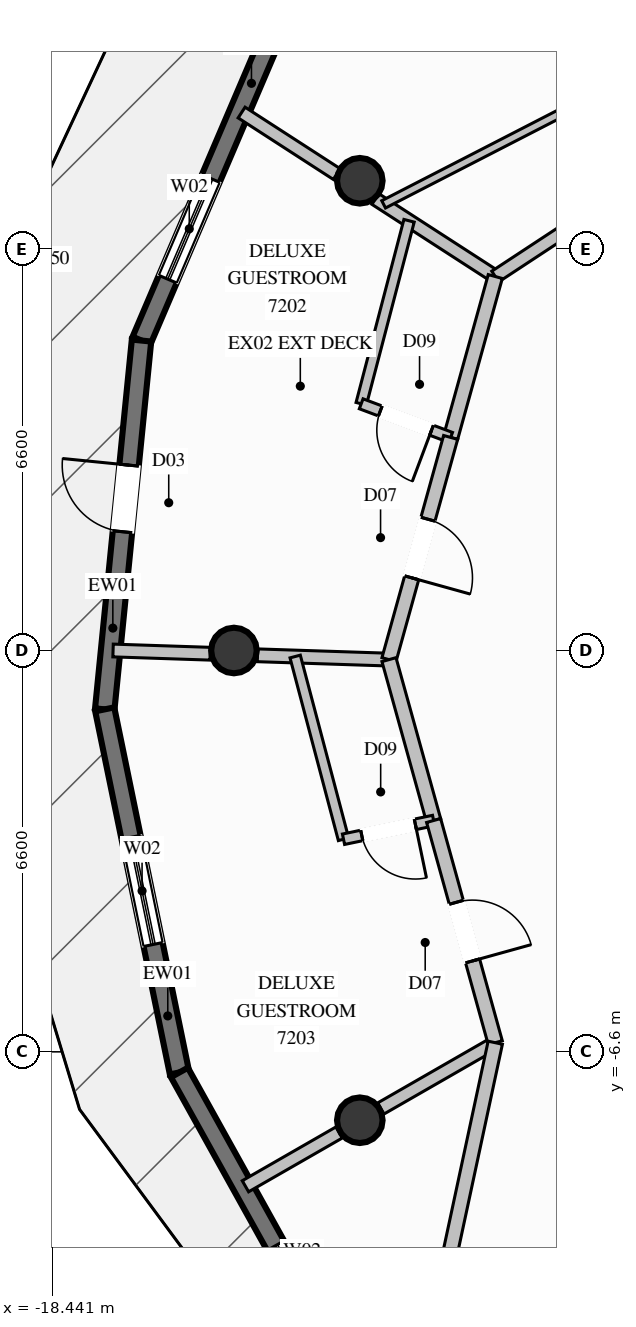
"""IFC4 building model, lengths in metres.
Left out: names, types, materials, properties, quantities, classifications, styles, units other than length and angle.
Written with IfcOpenShell. Run it as: python <this file> out.ifc"""

import sys

from ifc_helpers import new_model, si_unit, direction, frame, frame_2d, origin, origin_2d, place, context, subcontext, project, spatial, rectangle, circle, extrude, element, fill, save


model = new_model("IFC4")
c1 = context("Model", 3, precision=1e-05, world=origin(), true_north=direction((0.0, 1.0)))
c2 = subcontext(c1, "Body", "Model", "MODEL_VIEW")
j1 = project(units=[si_unit("LENGTHUNIT", "METRE"), si_unit("PLANEANGLEUNIT", "RADIAN")], contexts=[c1])
p1 = place(None, origin())
s1 = spatial("IfcSite", under=j1, at=p1, CompositionType="ELEMENT")
p2 = place(p1, origin())
s2 = spatial("IfcBuilding", under=s1, at=p2, CompositionType="ELEMENT")
p3 = place(p2, frame((0.0, 0.0, 270.6)))
s3 = spatial("IfcBuildingStorey", under=s2, at=p3, CompositionType="ELEMENT", Elevation=270.6)
for number, where, z_axis, x_axis in (
    (1, (-13.38, 7.725, 0.0), (0.0, 0.0, 1.0), (1.0, 0.0, 0.0)),
    (2, (-15.45, 0.0, 0.0), (0.0, 0.0, 1.0), (1.0, 0.0, 0.0)),
    (3, (-13.38, -7.725, 0.0), (0.0, 0.0, 1.0), (1.0, 0.0, 0.0)),
):
    element("IfcColumn", number, at=place(p3, frame(where, z_axis=z_axis, x_axis=x_axis)), inside=s3, PredefinedType="COLUMN", context=c2, shape_type="SweptSolid", body=[
        extrude(circle(Radius=0.375, at=origin_2d()), origin(), (0.0, 0.0, 1.0), 3.8),
    ])
p4 = place(p3, frame((-16.97, 5.097, 0.0), z_axis=(0.0, 0.0, 1.0), x_axis=(0.392999104836, 0.919538853773, 0.0)))
e4 = element("IfcWall", 4, at=p4, inside=s3, PredefinedType="SOLIDWALL", context=c2, shape_type="SweptSolid", body=[
    extrude(rectangle(XDim=6.053, YDim=0.32, at=frame_2d((3.027, 0.0))), origin(), (0.0, 0.0, 1.0), 3.57),
])
p5 = place(p4, frame((1.098, 0.0, 0.35)))
e5 = element("IfcOpeningElement", 5, at=p5, cuts=e4, PredefinedType="OPENING", context=c2, shape_type="SweptSolid", body=[
    extrude(rectangle(XDim=1.8, YDim=2.6, at=frame_2d((0.9, 1.3))), frame((0.0, 0.17, 0.0), z_axis=(0.0, -1.0, 0.0), x_axis=(1.0, 0.0, 0.0)), (0.0, 0.0, 1.0), 0.34),
])
p6 = place(p3, frame((-17.575, -0.968, 0.0), z_axis=(0.0, 0.0, 1.0), x_axis=(0.09925782999, 0.995061748429, 0.0)))
e6 = element("IfcWall", 6, at=p6, inside=s3, PredefinedType="SOLIDWALL", context=c2, shape_type="SweptSolid", body=[
    extrude(rectangle(XDim=6.095, YDim=0.32, at=frame_2d((3.047, 0.0))), origin(), (0.0, 0.0, 1.0), 3.57),
])
p7 = place(p6, frame((2.936, 0.0, 0.0)))
e7 = element("IfcOpeningElement", 7, at=p7, cuts=e6, PredefinedType="OPENING", context=c2, shape_type="SweptSolid", body=[
    extrude(rectangle(XDim=1.1, YDim=2.2, at=frame_2d((0.55, 1.1))), frame((0.0, 0.17, 0.0), z_axis=(0.0, -1.0, 0.0), x_axis=(1.0, 0.0, 0.0)), (0.0, 0.0, 1.0), 0.34),
])
p8 = place(p3, frame((-16.347, -6.939, 0.0), z_axis=(0.0, 0.0, 1.0), x_axis=(-0.201450639807, 0.979498667545, 0.0)))
e8 = element("IfcWall", 8, at=p8, inside=s3, PredefinedType="SOLIDWALL", context=c2, shape_type="SweptSolid", body=[
    extrude(rectangle(XDim=6.096, YDim=0.32, at=frame_2d((3.048, 0.0))), origin(), (0.0, 0.0, 1.0), 3.57),
])
p9 = place(p8, frame((2.148, 0.0, 0.35)))
e9 = element("IfcOpeningElement", 9, at=p9, cuts=e8, PredefinedType="OPENING", context=c2, shape_type="SweptSolid", body=[
    extrude(rectangle(XDim=1.8, YDim=2.6, at=frame_2d((0.9, 1.3))), frame((0.0, 0.17, 0.0), z_axis=(0.0, -1.0, 0.0), x_axis=(1.0, 0.0, 0.0)), (0.0, 0.0, 1.0), 0.34),
])
p10 = place(p3, frame((-13.407, -12.23, 0.0), z_axis=(0.0, 0.0, 1.0), x_axis=(-0.485704572822, 0.87412302792, 0.0)))
e10 = element("IfcWall", 10, at=p10, inside=s3, PredefinedType="SOLIDWALL", context=c2, shape_type="SweptSolid", body=[
    extrude(rectangle(XDim=6.053, YDim=0.32, at=frame_2d((3.026, 0.0))), origin(), (0.0, 0.0, 1.0), 3.57),
])
p11 = place(p10, frame((0.995, 0.0, 0.35)))
e11 = element("IfcOpeningElement", 11, at=p11, cuts=e10, PredefinedType="OPENING", context=c2, shape_type="SweptSolid", body=[
    extrude(rectangle(XDim=1.8, YDim=2.6, at=frame_2d((0.9, 1.3))), frame((0.0, 0.17, 0.0), z_axis=(0.0, -1.0, 0.0), x_axis=(1.0, 0.0, 0.0)), (0.0, 0.0, 1.0), 0.34),
])
p12 = place(p3, frame((-11.152, 6.15, 0.0), z_axis=(0.0, 0.0, 1.0), x_axis=(-0.83972632371, 0.54300985375, 0.0)))
e12 = element("IfcWall", 12, at=p12, inside=s3, PredefinedType="PARTITIONING", context=c2, shape_type="SweptSolid", body=[
    extrude(rectangle(XDim=2.348, YDim=0.21, at=frame_2d((1.174, 0.0))), origin(), (0.0, 0.0, 1.0), 3.011),
])
p13 = place(p3, frame((-13.759, 7.835, 0.0), z_axis=(0.0, 0.0, 1.0), x_axis=(-0.83972828355, 0.543006822982, 0.0)))
e13 = element("IfcWall", 13, at=p13, inside=s3, PredefinedType="PARTITIONING", context=c2, shape_type="SweptSolid", body=[
    extrude(rectangle(XDim=1.864, YDim=0.21, at=frame_2d((0.932, 0.0))), origin(), (0.0, 0.0, 1.0), 3.57),
])
p14 = place(p3, frame((-12.9, -0.15, 0.0), z_axis=(0.0, 0.0, 1.0), x_axis=(-0.999464758513, 0.032713857784, 0.0)))
e14 = element("IfcWall", 14, at=p14, inside=s3, PredefinedType="PARTITIONING", context=c2, shape_type="SweptSolid", body=[
    extrude(rectangle(XDim=2.164, YDim=0.21, at=frame_2d((1.082, 0.0))), origin(), (0.0, 0.0, 1.0), 3.57),
])
p15 = place(p3, frame((-15.841, -0.053, 0.0), z_axis=(0.0, 0.0, 1.0), x_axis=(-0.999450151728, 0.033157114038, 0.0)))
e15 = element("IfcWall", 15, at=p15, inside=s3, PredefinedType="PARTITIONING", context=c2, shape_type="SweptSolid", body=[
    extrude(rectangle(XDim=1.598, YDim=0.21, at=frame_2d((0.799, 0.0))), origin(), (0.0, 0.0, 1.0), 3.57),
])
p16 = place(p3, frame((-11.152, -6.45, 0.0), z_axis=(0.0, 0.0, 1.0), x_axis=(-0.867022876226, -0.498268333433, 0.0)))
e16 = element("IfcWall", 16, at=p16, inside=s3, PredefinedType="PARTITIONING", context=c2, shape_type="SweptSolid", body=[
    extrude(rectangle(XDim=2.172, YDim=0.21, at=frame_2d((1.086, 0.0))), origin(), (0.0, 0.0, 1.0), 3.011),
])
p17 = place(p3, frame((-13.72, -7.926, 0.0), z_axis=(0.0, 0.0, 1.0), x_axis=(-0.867167400639, -0.498016766052, 0.0)))
e17 = element("IfcWall", 17, at=p17, inside=s3, PredefinedType="PARTITIONING", context=c2, shape_type="SweptSolid", body=[
    extrude(rectangle(XDim=1.777, YDim=0.21, at=frame_2d((0.889, 0.0))), origin(), (0.0, 0.0, 1.0), 3.57),
])
p18 = place(p3, frame((-11.152, 6.15, 0.0), z_axis=(0.0, 0.0, 1.0), x_axis=(0.835549960432, 0.549414473437, 0.0)))
e18 = element("IfcWall", 18, at=p18, inside=s3, PredefinedType="PARTITIONING", context=c2, shape_type="SweptSolid", body=[
    extrude(rectangle(XDim=4.55, YDim=0.21, at=frame_2d((2.275, 0.0))), origin(), (0.0, 0.0, 1.0), 3.57),
])
p19 = place(p3, frame((-12.988, 7.337, 0.0), z_axis=(0.0, 0.0, 1.0), x_axis=(0.889161723705, 0.457593082441, 0.0)))
e19 = element("IfcWall", 19, at=p19, inside=s3, PredefinedType="PARTITIONING", context=c2, shape_type="SweptSolid", body=[
    extrude(rectangle(XDim=12.177, YDim=0.135, at=frame_2d((6.088, 0.0))), origin(), (0.0, 0.0, 1.0), 3.138),
])
p20 = place(p19, frame((5.613, 0.0, 0.0)))
e20 = element("IfcOpeningElement", 20, at=p20, cuts=e19, PredefinedType="OPENING", context=c2, shape_type="SweptSolid", body=[
    extrude(rectangle(XDim=0.95, YDim=2.1, at=frame_2d((0.475, 1.05))), frame((0.0, 0.078, 0.0), z_axis=(0.0, -1.0, 0.0), x_axis=(1.0, 0.0, 0.0)), (0.0, 0.0, 1.0), 0.155),
])
p21 = place(p3, frame((-11.152, 6.15, 0.0), z_axis=(0.0, 0.0, 1.0), x_axis=(-0.267267816759, -0.963622288101, 0.0)))
e21 = element("IfcWall", 21, at=p21, inside=s3, PredefinedType="PARTITIONING", context=c2, shape_type="SweptSolid", body=[
    extrude(rectangle(XDim=2.746, YDim=0.24, at=frame_2d((1.373, 0.0))), origin(), (0.0, 0.0, 1.0), 3.57),
])
p22 = place(p3, frame((-12.57, 7.067, 0.0), z_axis=(0.0, 0.0, 1.0), x_axis=(-0.25291700501, -0.967487978518, 0.0)))
e22 = element("IfcWall", 22, at=p22, inside=s3, PredefinedType="PLUMBINGWALL", context=c2, shape_type="SweptSolid", body=[
    extrude(rectangle(XDim=3.111, YDim=0.175, at=frame_2d((1.556, 0.0))), origin(), (0.0, 0.0, 1.0), 3.57),
])
p23 = place(p3, frame((-11.886, 3.504, 0.0), z_axis=(0.0, 0.0, 1.0), x_axis=(-0.936041555274, 0.351889480945, 0.0)))
e23 = element("IfcWall", 23, at=p23, inside=s3, PredefinedType="PLUMBINGWALL", context=c2, shape_type="SweptSolid", body=[
    extrude(rectangle(XDim=1.572, YDim=0.175, at=frame_2d((0.786, 0.0))), origin(), (0.0, 0.0, 1.0), 3.57),
])
p24 = place(p23, frame((0.336, 0.0, 0.0)))
e24 = element("IfcOpeningElement", 24, at=p24, cuts=e23, PredefinedType="OPENING", context=c2, shape_type="SweptSolid", body=[
    extrude(rectangle(XDim=0.9, YDim=2.1, at=frame_2d((0.45, 1.05))), frame((0.0, 0.098, 0.0), z_axis=(0.0, -1.0, 0.0), x_axis=(1.0, 0.0, 0.0)), (0.0, 0.0, 1.0), 0.195),
])
p25 = place(p3, frame((-11.886, 3.504, 0.0), z_axis=(0.0, 0.0, 1.0), x_axis=(-0.267391479621, -0.96358798074, 0.0)))
e25 = element("IfcWall", 25, at=p25, inside=s3, PredefinedType="PARTITIONING", context=c2, shape_type="SweptSolid", body=[
    extrude(rectangle(XDim=3.792, YDim=0.24, at=frame_2d((1.896, 0.0))), origin(), (0.0, 0.0, 1.0), 3.57),
])
p26 = place(p25, frame((1.396, 0.0, 0.0)))
e26 = element("IfcOpeningElement", 26, at=p26, cuts=e25, PredefinedType="OPENING", context=c2, shape_type="SweptSolid", body=[
    extrude(rectangle(XDim=1.0, YDim=2.2, at=frame_2d((0.5, 1.1))), frame((0.0, 0.13, 0.0), z_axis=(0.0, -1.0, 0.0), x_axis=(1.0, 0.0, 0.0)), (0.0, 0.0, 1.0), 0.26),
])
p27 = place(p3, frame((-12.9, -0.15, 0.0), z_axis=(0.0, 0.0, 1.0), x_axis=(0.267267816759, -0.963622288101, 0.0)))
e27 = element("IfcWall", 27, at=p27, inside=s3, PredefinedType="PARTITIONING", context=c2, shape_type="SweptSolid", body=[
    extrude(rectangle(XDim=2.746, YDim=0.24, at=frame_2d((1.373, 0.0))), origin(), (0.0, 0.0, 1.0), 3.57),
])
p28 = place(p3, frame((-14.443, -0.099, 0.0), z_axis=(0.0, 0.0, 1.0), x_axis=(0.255819158331, -0.966724654817, 0.0)))
e28 = element("IfcWall", 28, at=p28, inside=s3, PredefinedType="PLUMBINGWALL", context=c2, shape_type="SweptSolid", body=[
    extrude(rectangle(XDim=3.108, YDim=0.175, at=frame_2d((1.554, 0.0))), origin(), (0.0, 0.0, 1.0), 3.57),
])
p29 = place(p3, frame((-12.166, -2.796, 0.0), z_axis=(0.0, 0.0, 1.0), x_axis=(-0.97906353562, -0.203554889943, 0.0)))
e29 = element("IfcWall", 29, at=p29, inside=s3, PredefinedType="PLUMBINGWALL", context=c2, shape_type="SweptSolid", body=[
    extrude(rectangle(XDim=1.514, YDim=0.175, at=frame_2d((0.757, 0.0))), origin(), (0.0, 0.0, 1.0), 3.57),
])
p30 = place(p29, frame((0.307, 0.0, 0.0)))
e30 = element("IfcOpeningElement", 30, at=p30, cuts=e29, PredefinedType="OPENING", context=c2, shape_type="SweptSolid", body=[
    extrude(rectangle(XDim=0.9, YDim=2.1, at=frame_2d((0.45, 1.05))), frame((0.0, 0.098, 0.0), z_axis=(0.0, -1.0, 0.0), x_axis=(1.0, 0.0, 0.0)), (0.0, 0.0, 1.0), 0.195),
])
p31 = place(p3, frame((-12.166, -2.796, 0.0), z_axis=(0.0, 0.0, 1.0), x_axis=(0.267374891444, -0.963592583733, 0.0)))
e31 = element("IfcWall", 31, at=p31, inside=s3, PredefinedType="PARTITIONING", context=c2, shape_type="SweptSolid", body=[
    extrude(rectangle(XDim=3.792, YDim=0.24, at=frame_2d((1.896, 0.0))), origin(), (0.0, 0.0, 1.0), 3.57),
])
p32 = place(p31, frame((1.396, 0.0, 0.0)))
e32 = element("IfcOpeningElement", 32, at=p32, cuts=e31, PredefinedType="OPENING", context=c2, shape_type="SweptSolid", body=[
    extrude(rectangle(XDim=1.0, YDim=2.2, at=frame_2d((0.5, 1.1))), frame((0.0, 0.13, 0.0), z_axis=(0.0, -1.0, 0.0), x_axis=(1.0, 0.0, 0.0)), (0.0, 0.0, 1.0), 0.26),
])
p33 = place(p3, frame((-11.152, -6.45, 0.0), z_axis=(0.0, 0.0, 1.0), x_axis=(-0.209791126954, -0.977746226304, 0.0)))
e33 = element("IfcWall", 33, at=p33, inside=s3, PredefinedType="PARTITIONING", context=c2, shape_type="SweptSolid", body=[
    extrude(rectangle(XDim=5.472, YDim=0.24, at=frame_2d((2.736, 0.0))), origin(), (0.0, 0.0, 1.0), 3.57),
])
p34 = place(p5, origin())
e34 = element("IfcWindow", 34, at=p34, inside=s3, PartitioningType="SINGLE_PANEL", PredefinedType="WINDOW", context=c2, shape_type="SweptSolid", body=[
    extrude(rectangle(XDim=1.8, YDim=2.6, at=frame_2d((0.9, 1.3))), frame((0.0, 0.03, 0.0), z_axis=(0.0, -1.0, 0.0), x_axis=(1.0, 0.0, 0.0)), (0.0, 0.0, 1.0), 0.06),
])
fill(e5, e34)
p35 = place(p7, origin())
e35 = element("IfcDoor", 35, at=p35, inside=s3, OperationType="SINGLE_SWING_RIGHT", PredefinedType="DOOR", context=c2, shape_type="SweptSolid", body=[
    extrude(rectangle(XDim=1.1, YDim=2.2, at=frame_2d((0.55, 1.1))), frame((0.0, 0.025, 0.0), z_axis=(0.0, -1.0, 0.0), x_axis=(1.0, 0.0, 0.0)), (0.0, 0.0, 1.0), 0.05),
])
fill(e7, e35)
p36 = place(p9, origin())
e36 = element("IfcWindow", 36, at=p36, inside=s3, PartitioningType="SINGLE_PANEL", PredefinedType="WINDOW", context=c2, shape_type="SweptSolid", body=[
    extrude(rectangle(XDim=1.8, YDim=2.6, at=frame_2d((0.9, 1.3))), frame((0.0, 0.03, 0.0), z_axis=(0.0, -1.0, 0.0), x_axis=(1.0, 0.0, 0.0)), (0.0, 0.0, 1.0), 0.06),
])
fill(e9, e36)
p37 = place(p11, origin())
e37 = element("IfcWindow", 37, at=p37, inside=s3, PartitioningType="SINGLE_PANEL", PredefinedType="WINDOW", context=c2, shape_type="SweptSolid", body=[
    extrude(rectangle(XDim=1.8, YDim=2.6, at=frame_2d((0.9, 1.3))), frame((0.0, 0.03, 0.0), z_axis=(0.0, -1.0, 0.0), x_axis=(1.0, 0.0, 0.0)), (0.0, 0.0, 1.0), 0.06),
])
fill(e11, e37)
p38 = place(p24, origin())
e38 = element("IfcDoor", 38, at=p38, inside=s3, OperationType="SINGLE_SWING_LEFT", PredefinedType="DOOR", context=c2, shape_type="SweptSolid", body=[
    extrude(rectangle(XDim=0.9, YDim=2.1, at=frame_2d((0.45, 1.05))), frame((0.0, 0.025, 0.0), z_axis=(0.0, -1.0, 0.0), x_axis=(1.0, 0.0, 0.0)), (0.0, 0.0, 1.0), 0.05),
])
fill(e24, e38)
p39 = place(p26, origin())
e39 = element("IfcDoor", 39, at=p39, inside=s3, OperationType="SINGLE_SWING_RIGHT", PredefinedType="DOOR", context=c2, shape_type="SweptSolid", body=[
    extrude(rectangle(XDim=1.0, YDim=2.2, at=frame_2d((0.5, 1.1))), frame((0.0, 0.025, 0.0), z_axis=(0.0, -1.0, 0.0), x_axis=(1.0, 0.0, 0.0)), (0.0, 0.0, 1.0), 0.05),
])
fill(e26, e39)
p40 = place(p30, origin())
e40 = element("IfcDoor", 40, at=p40, inside=s3, OperationType="SINGLE_SWING_LEFT", PredefinedType="DOOR", context=c2, shape_type="SweptSolid", body=[
    extrude(rectangle(XDim=0.9, YDim=2.1, at=frame_2d((0.45, 1.05))), frame((0.0, 0.025, 0.0), z_axis=(0.0, -1.0, 0.0), x_axis=(1.0, 0.0, 0.0)), (0.0, 0.0, 1.0), 0.05),
])
fill(e30, e40)
p41 = place(p32, origin())
e41 = element("IfcDoor", 41, at=p41, inside=s3, OperationType="SINGLE_SWING_RIGHT", PredefinedType="DOOR", context=c2, shape_type="SweptSolid", body=[
    extrude(rectangle(XDim=1.0, YDim=2.2, at=frame_2d((0.5, 1.1))), frame((0.0, 0.025, 0.0), z_axis=(0.0, -1.0, 0.0), x_axis=(1.0, 0.0, 0.0)), (0.0, 0.0, 1.0), 0.05),
])
fill(e32, e41)
save(model, sys.argv[1])
